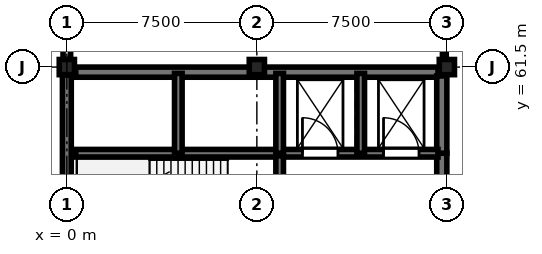
"""IFC4 building model, lengths in metres.
Left out: names, types, materials, properties, quantities, classifications, styles, units other than length and angle.
Written with IfcOpenShell. Run it as: python <this file> out.ifc"""

import sys

from ifc_helpers import new_model, si_unit, direction, frame, frame_2d, origin, origin_2d, place, context, subcontext, project, spatial, rectangle, circle, extrude, element, fill, save


model = new_model("IFC4")
c1 = context("Model", 3, precision=1e-05, world=origin(), true_north=direction((0.0, 1.0)))
c2 = subcontext(c1, "Body", "Model", "MODEL_VIEW")
j1 = project(units=[si_unit("LENGTHUNIT", "METRE"), si_unit("PLANEANGLEUNIT", "RADIAN")], contexts=[c1])
p1 = place(None, origin())
s1 = spatial("IfcSite", under=j1, at=p1, CompositionType="ELEMENT")
p2 = place(p1, origin())
s2 = spatial("IfcBuilding", under=s1, at=p2, CompositionType="ELEMENT")
p3 = place(p2, frame((0.0, 0.0, 21.9)))
s3 = spatial("IfcBuildingStorey", under=s2, at=p3, CompositionType="ELEMENT", Elevation=21.9)
p4 = place(p3, frame((0.0, 61.5, 0.0), z_axis=(0.0, 0.0, 1.0), x_axis=(1.0, 0.0, 0.0)))
e1 = element("IfcColumn", 1, at=p4, inside=s3, PredefinedType="COLUMN", context=c2, shape_type="SweptSolid", body=[
    extrude(rectangle(XDim=0.6, YDim=0.6, at=origin_2d()), origin(), (0.0, 0.0, 1.0), 4.05),
])
p5 = place(p3, frame((7.5, 61.5, 0.0), z_axis=(0.0, 0.0, 1.0), x_axis=(1.0, 0.0, 0.0)))
e2 = element("IfcColumn", 2, at=p5, inside=s3, PredefinedType="COLUMN", context=c2, shape_type="SweptSolid", body=[
    extrude(circle(Radius=0.3, at=origin_2d()), origin(), (0.0, 0.0, 1.0), 4.05),
])
p6 = place(p3, frame((15.0, 61.5, 0.0), z_axis=(0.0, 0.0, 1.0), x_axis=(1.0, 0.0, 0.0)))
e3 = element("IfcColumn", 3, at=p6, inside=s3, PredefinedType="COLUMN", context=c2, shape_type="SweptSolid", body=[
    extrude(rectangle(XDim=0.6, YDim=0.6, at=origin_2d()), origin(), (0.0, 0.0, 1.0), 4.05),
])
p7 = place(p3, frame((0.0, 54.31, 0.0), z_axis=(0.0, 0.0, 1.0), x_axis=(0.0, 1.0, 0.0)))
e4 = element("IfcWall", 4, at=p7, inside=s3, PredefinedType="SHEAR", context=c2, shape_type="SweptSolid", body=[
    extrude(rectangle(XDim=6.88, YDim=0.35, at=frame_2d((3.44, 0.0))), origin(), (0.0, 0.0, 1.0), 3.77),
])
p8 = place(p3, frame((0.0, 61.81, 0.0), z_axis=(0.0, 0.0, 1.0), x_axis=(0.0, 1.0, 0.0)))
e5 = element("IfcWall", 5, at=p8, inside=s3, PredefinedType="STANDARD", context=c2, shape_type="SweptSolid", body=[
    extrude(rectangle(XDim=6.88, YDim=0.3, at=frame_2d((3.44, 0.0))), origin(), (0.0, 0.0, 1.0), 3.17),
])
p9 = place(p8, frame((2.39, 0.0, 0.9)))
e6 = element("IfcOpeningElement", 6, at=p9, cuts=e5, PredefinedType="OPENING", context=c2, shape_type="SweptSolid", body=[
    extrude(rectangle(XDim=2.1, YDim=1.99, at=frame_2d((1.05, 0.995))), frame((0.0, 0.16, 0.0), z_axis=(0.0, -1.0, 0.0), x_axis=(1.0, 0.0, 0.0)), (0.0, 0.0, 1.0), 0.32),
])
p10 = place(p3, frame((0.35, 61.3, 0.0), z_axis=(0.0, 0.0, 1.0), x_axis=(1.0, 0.0, 0.0)))
e7 = element("IfcWall", 7, at=p10, inside=s3, PredefinedType="SHEAR", context=c2, shape_type="SweptSolid", body=[
    extrude(rectangle(XDim=14.3, YDim=0.4, at=frame_2d((7.15, 0.0))), origin(), (0.0, 0.0, 1.0), 3.77),
])
p11 = place(p3, frame((14.8, 54.35, 0.0), z_axis=(0.0, 0.0, 1.0), x_axis=(0.0, 1.0, 0.0)))
e8 = element("IfcWall", 8, at=p11, inside=s3, PredefinedType="SHEAR", context=c2, shape_type="SweptSolid", body=[
    extrude(rectangle(XDim=3.75, YDim=0.4, at=frame_2d((1.875, 0.0))), origin(), (0.0, 0.0, 1.0), 3.77),
])
p12 = place(p3, frame((14.8, 58.1, 0.0), z_axis=(0.0, 0.0, 1.0), x_axis=(0.0, 1.0, 0.0)))
e9 = element("IfcWall", 9, at=p12, inside=s3, PredefinedType="SHEAR", context=c2, shape_type="SweptSolid", body=[
    extrude(rectangle(XDim=3.05, YDim=0.4, at=frame_2d((1.525, 0.0))), origin(), (0.0, 0.0, 1.0), 3.77),
])
p13 = place(p3, frame((0.35, 58.1, 0.0), z_axis=(0.0, 0.0, 1.0), x_axis=(1.0, 0.0, 0.0)))
e10 = element("IfcWall", 10, at=p13, inside=s3, PredefinedType="SHEAR", context=c2, shape_type="SweptSolid", body=[
    extrude(rectangle(XDim=8.05, YDim=0.3, at=frame_2d((4.025, 0.0))), origin(), (0.0, 0.0, 1.0), 3.77),
])
p14 = place(p3, frame((8.4, 58.1, 0.0), z_axis=(0.0, 0.0, 1.0), x_axis=(1.0, 0.0, 0.0)))
e11 = element("IfcWall", 11, at=p14, inside=s3, PredefinedType="SHEAR", context=c2, shape_type="SweptSolid", body=[
    extrude(rectangle(XDim=6.25, YDim=0.3, at=frame_2d((3.125, 0.0))), origin(), (0.0, 0.0, 1.0), 3.77),
])
p15 = place(p14, frame((0.9, 0.0, 0.0)))
e12 = element("IfcOpeningElement", 12, at=p15, cuts=e11, PredefinedType="OPENING", context=c2, shape_type="SweptSolid", body=[
    extrude(rectangle(XDim=1.4, YDim=2.25, at=frame_2d((0.7, 1.125))), frame((0.0, 0.16, 0.0), z_axis=(0.0, -1.0, 0.0), x_axis=(1.0, 0.0, 0.0)), (0.0, 0.0, 1.0), 0.32),
])
p16 = place(p14, frame((4.1, 0.0, 0.0)))
e13 = element("IfcOpeningElement", 13, at=p16, cuts=e11, PredefinedType="OPENING", context=c2, shape_type="SweptSolid", body=[
    extrude(rectangle(XDim=1.4, YDim=2.25, at=frame_2d((0.7, 1.125))), frame((0.0, 0.16, 0.0), z_axis=(0.0, -1.0, 0.0), x_axis=(1.0, 0.0, 0.0)), (0.0, 0.0, 1.0), 0.32),
])
p17 = place(p3, frame((8.4, 58.0, 0.0), z_axis=(0.0, 0.0, 1.0), x_axis=(0.0, -1.0, 0.0)))
e14 = element("IfcWall", 14, at=p17, inside=s3, PredefinedType="SHEAR", context=c2, shape_type="SweptSolid", body=[
    extrude(rectangle(XDim=3.65, YDim=0.3, at=frame_2d((1.825, 0.0))), origin(), (0.0, 0.0, 1.0), 3.77),
])
p18 = place(p17, frame((1.22, 0.0, 0.0)))
e15 = element("IfcOpeningElement", 15, at=p18, cuts=e14, PredefinedType="OPENING", context=c2, shape_type="SweptSolid", body=[
    extrude(rectangle(XDim=1.2, YDim=2.25, at=frame_2d((0.6, 1.125))), frame((0.0, 0.16, 0.0), z_axis=(0.0, -1.0, 0.0), x_axis=(1.0, 0.0, 0.0)), (0.0, 0.0, 1.0), 0.32),
])
for number, where, z_axis, x_axis in (
    (16, (4.4, 58.1, 0.0), (0.0, 0.0, 1.0), (0.0, 1.0, 0.0)),
    (17, (8.4, 58.1, 0.0), (0.0, 0.0, 1.0), (0.0, 1.0, 0.0)),
    (18, (11.6, 58.1, 0.0), (0.0, 0.0, 1.0), (0.0, 1.0, 0.0)),
):
    element("IfcWall", number, at=place(p3, frame(where, z_axis=z_axis, x_axis=x_axis)), inside=s3, PredefinedType="SHEAR", context=c2, shape_type="SweptSolid", body=[
        extrude(rectangle(XDim=3.15, YDim=0.3, at=frame_2d((1.575, 0.0))), origin(), (0.0, 0.0, 1.0), 3.77),
    ])
p19 = place(p3, frame((14.9, 61.93, 0.0), z_axis=(0.0, 0.0, 1.0), x_axis=(0.0, 1.0, 0.0)))
e19 = element("IfcWall", 19, at=p19, inside=s3, PredefinedType="PARTITIONING", context=c2, shape_type="SweptSolid", body=[
    extrude(rectangle(XDim=6.79, YDim=0.15, at=frame_2d((3.395, 0.0))), origin(), (0.0, 0.0, 1.0), 3.205),
])
p20 = place(p19, frame((2.72, 0.0, 0.0)))
e20 = element("IfcOpeningElement", 20, at=p20, cuts=e19, PredefinedType="OPENING", context=c2, shape_type="SweptSolid", body=[
    extrude(rectangle(XDim=1.35, YDim=2.25, at=frame_2d((0.675, 1.125))), frame((0.0, 0.085, 0.0), z_axis=(0.0, -1.0, 0.0), x_axis=(1.0, 0.0, 0.0)), (0.0, 0.0, 1.0), 0.17),
])
p21 = place(p15, origin())
e21 = element("IfcDoor", 21, at=p21, inside=s3, OperationType="DOUBLE_DOOR_SLIDING", PredefinedType="DOOR", context=c2, shape_type="SweptSolid", body=[
    extrude(rectangle(XDim=1.4, YDim=2.25, at=frame_2d((0.7, 1.125))), frame((0.0, 0.025, 0.0), z_axis=(0.0, -1.0, 0.0), x_axis=(1.0, 0.0, 0.0)), (0.0, 0.0, 1.0), 0.05),
])
fill(e12, e21)
p22 = place(p16, origin())
e22 = element("IfcDoor", 22, at=p22, inside=s3, OperationType="DOUBLE_DOOR_SLIDING", PredefinedType="DOOR", context=c2, shape_type="SweptSolid", body=[
    extrude(rectangle(XDim=1.4, YDim=2.25, at=frame_2d((0.7, 1.125))), frame((0.0, 0.025, 0.0), z_axis=(0.0, -1.0, 0.0), x_axis=(1.0, 0.0, 0.0)), (0.0, 0.0, 1.0), 0.05),
])
fill(e13, e22)
save(model, sys.argv[1])
